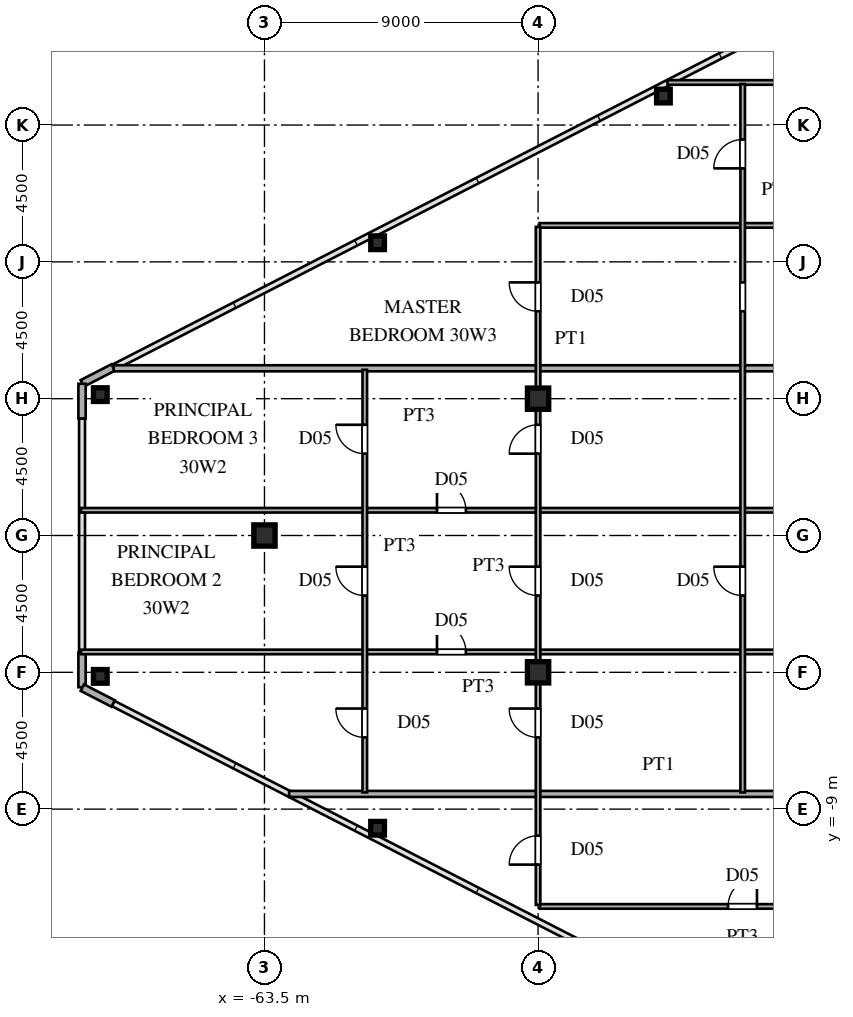
"""IFC4 building model, lengths in metres.
Left out: names, types, materials, properties, quantities, classifications, styles, units other than length and angle.
Written with IfcOpenShell. Run it as: python <this file> out.ifc"""

import sys

from ifc_helpers import new_model, si_unit, direction, frame, frame_2d, origin, origin_2d, place, context, subcontext, project, spatial, rectangle, hollow_rectangle, i_section, extrude, source, transform, mapped, element, fill, save


model = new_model("IFC4")
c1 = context("Model", 3, precision=1e-05, world=origin(), true_north=direction((0.0, 1.0)))
c2 = subcontext(c1, "Body", "Model", "MODEL_VIEW")
j1 = project(units=[si_unit("LENGTHUNIT", "METRE"), si_unit("PLANEANGLEUNIT", "RADIAN")], contexts=[c1])
p1 = place(None, origin())
s1 = spatial("IfcSite", under=j1, at=p1, CompositionType="ELEMENT")
p2 = place(p1, origin())
s2 = spatial("IfcBuilding", under=s1, at=p2, CompositionType="ELEMENT")
p3 = place(p2, frame((0.0, 0.0, 114.0)))
s3 = spatial("IfcBuildingStorey", under=s2, at=p3, CompositionType="ELEMENT", Elevation=114.0)
m1 = source(origin(), c2, "Body", "SweptSolid", [
    extrude(i_section(OverallWidth=0.7, OverallDepth=0.7, WebThickness=0.028, FlangeThickness=0.045, at=origin_2d()), origin(), (0.0, 0.0, 1.0), 3.6),
])
for number, where, z_axis, x_axis in (
    (1, (-54.5, -4.5, 0.0), (0.0, 0.0, 1.0), (1.0, 0.0, 0.0)),
    (2, (-54.5, 4.5, 0.0), (0.0, 0.0, 1.0), (1.0, 0.0, 0.0)),
    (3, (-63.5, 0.0, 0.0), (0.0, 0.0, 1.0), (1.0, 0.0, 0.0)),
):
    element("IfcColumn", number, at=place(p3, frame(where, z_axis=z_axis, x_axis=x_axis)), inside=s3, PredefinedType="COLUMN", context=c2, shape_type="MappedRepresentation", body=[
        mapped(m1, transform((0.0, 0.0, 0.0), scale=1.0)),
    ])
m2 = source(origin(), c2, "Body", "SweptSolid", [
    extrude(hollow_rectangle(XDim=0.45, YDim=0.45, WallThickness=0.018, at=origin_2d()), origin(), (0.0, 0.0, 1.0), 3.6),
])
for number, where, z_axis, x_axis in (
    (4, (-68.9, 4.634, 0.0), (0.0, 0.0, 1.0), (1.0, 0.0, 0.0)),
    (5, (-68.9, -4.634, 0.0), (0.0, 0.0, 1.0), (1.0, 0.0, 0.0)),
    (6, (-59.779, -9.629, 0.0), (0.0, 0.0, 1.0), (1.0, 0.0, 0.0)),
    (7, (-50.377, 14.453, 0.0), (0.0, 0.0, 1.0), (1.0, 0.0, 0.0)),
    (8, (-59.779, 9.629, 0.0), (0.0, 0.0, 1.0), (1.0, 0.0, 0.0)),
):
    element("IfcColumn", number, at=place(p3, frame(where, z_axis=z_axis, x_axis=x_axis)), inside=s3, PredefinedType="COLUMN", context=c2, shape_type="MappedRepresentation", body=[
        mapped(m2, transform((0.0, 0.0, 0.0), scale=1.0)),
    ])
p4 = place(p3, frame((-68.477, 5.525, 0.0), z_axis=(0.0, 0.0, 1.0), x_axis=(-0.889797395748, -0.456355776255, 0.0)))
e9 = element("IfcWall", 9, at=p4, inside=s3, PredefinedType="SOLIDWALL", context=c2, shape_type="SweptSolid", body=[
    extrude(rectangle(XDim=1.14, YDim=0.24, at=frame_2d((0.57, 0.0))), origin(), (0.0, 0.0, 1.0), 3.38),
])
for number, where, z_axis, x_axis in (
    (10, (-69.5, 4.99, 0.0), (0.0, 0.0, 1.0), (0.0, -1.0, 0.0)),
    (11, (-69.5, -3.85, 0.0), (0.0, 0.0, 1.0), (0.0, -1.0, 0.0)),
):
    element("IfcWall", number, at=place(p3, frame(where, z_axis=z_axis, x_axis=x_axis)), inside=s3, PredefinedType="SOLIDWALL", context=c2, shape_type="SweptSolid", body=[
        extrude(rectangle(XDim=1.14, YDim=0.24, at=frame_2d((0.57, 0.0))), origin(), (0.0, 0.0, 1.0), 3.38),
    ])
p5 = place(p3, frame((-69.491, -5.005, 0.0), z_axis=(0.0, 0.0, 1.0), x_axis=(0.889797395748, -0.456355776255, 0.0)))
e12 = element("IfcWall", 12, at=p5, inside=s3, PredefinedType="SOLIDWALL", context=c2, shape_type="SweptSolid", body=[
    extrude(rectangle(XDim=1.14, YDim=0.24, at=frame_2d((0.57, 0.0))), origin(), (0.0, 0.0, 1.0), 3.38),
])
p6 = place(p3, frame((-54.45, -12.2, 0.0), z_axis=(0.0, 0.0, 1.0), x_axis=(1.0, 0.0, 0.0)))
e13 = element("IfcWall", 13, at=p6, inside=s3, PredefinedType="PARTITIONING", context=c2, shape_type="SweptSolid", body=[
    extrude(rectangle(XDim=13.35, YDim=0.15, at=frame_2d((6.675, 0.0))), origin(), (0.0, 0.0, 1.0), 3.38),
])
p7 = place(p6, frame((6.2, 0.0, 0.0)))
e14 = element("IfcOpeningElement", 14, at=p7, cuts=e13, PredefinedType="OPENING", context=c2, shape_type="SweptSolid", body=[
    extrude(rectangle(XDim=0.95, YDim=2.15, at=frame_2d((0.475, 1.075))), frame((0.0, 0.085, 0.0), z_axis=(0.0, -1.0, 0.0), x_axis=(1.0, 0.0, 0.0)), (0.0, 0.0, 1.0), 0.17),
])
p8 = place(p3, frame((-62.69, -8.5, 0.0), z_axis=(0.0, 0.0, 1.0), x_axis=(1.0, 0.0, 0.0)))
e15 = element("IfcWall", 15, at=p8, inside=s3, PredefinedType="PARTITIONING", context=c2, shape_type="SweptSolid", body=[
    extrude(rectangle(XDim=24.31, YDim=0.2, at=frame_2d((12.155, 0.0))), origin(), (0.0, 0.0, 1.0), 3.38),
])
p9 = place(p3, frame((-69.535, -3.83, 0.0), z_axis=(0.0, 0.0, 1.0), x_axis=(1.0, 0.0, 0.0)))
e16 = element("IfcWall", 16, at=p9, inside=s3, PredefinedType="PARTITIONING", context=c2, shape_type="SweptSolid", body=[
    extrude(rectangle(XDim=28.435, YDim=0.15, at=frame_2d((14.217, 0.0))), origin(), (0.0, 0.0, 1.0), 3.38),
])
p10 = place(p9, frame((24.647, 0.0, 0.0)))
e17 = element("IfcOpeningElement", 17, at=p10, cuts=e16, PredefinedType="OPENING", context=c2, shape_type="SweptSolid", body=[
    extrude(rectangle(XDim=0.95, YDim=2.15, at=frame_2d((0.475, 1.075))), frame((0.0, 0.085, 0.0), z_axis=(0.0, -1.0, 0.0), x_axis=(1.0, 0.0, 0.0)), (0.0, 0.0, 1.0), 0.17),
])
p11 = place(p9, frame((11.71, 0.0, 0.0)))
e18 = element("IfcOpeningElement", 18, at=p11, cuts=e16, PredefinedType="OPENING", context=c2, shape_type="SweptSolid", body=[
    extrude(rectangle(XDim=0.95, YDim=2.15, at=frame_2d((0.475, 1.075))), frame((0.0, 0.085, 0.0), z_axis=(0.0, -1.0, 0.0), x_axis=(1.0, 0.0, 0.0)), (0.0, 0.0, 1.0), 0.17),
])
p12 = place(p3, frame((-69.535, 0.83, 0.0), z_axis=(0.0, 0.0, 1.0), x_axis=(1.0, 0.0, 0.0)))
e19 = element("IfcWall", 19, at=p12, inside=s3, PredefinedType="PARTITIONING", context=c2, shape_type="SweptSolid", body=[
    extrude(rectangle(XDim=28.435, YDim=0.15, at=frame_2d((14.217, 0.0))), origin(), (0.0, 0.0, 1.0), 3.38),
])
p13 = place(p12, frame((24.647, 0.0, 0.0)))
e20 = element("IfcOpeningElement", 20, at=p13, cuts=e19, PredefinedType="OPENING", context=c2, shape_type="SweptSolid", body=[
    extrude(rectangle(XDim=0.95, YDim=2.15, at=frame_2d((0.475, 1.075))), frame((0.0, 0.085, 0.0), z_axis=(0.0, -1.0, 0.0), x_axis=(1.0, 0.0, 0.0)), (0.0, 0.0, 1.0), 0.17),
])
p14 = place(p12, frame((11.71, 0.0, 0.0)))
e21 = element("IfcOpeningElement", 21, at=p14, cuts=e19, PredefinedType="OPENING", context=c2, shape_type="SweptSolid", body=[
    extrude(rectangle(XDim=0.95, YDim=2.15, at=frame_2d((0.475, 1.075))), frame((0.0, 0.085, 0.0), z_axis=(0.0, -1.0, 0.0), x_axis=(1.0, 0.0, 0.0)), (0.0, 0.0, 1.0), 0.17),
])
p15 = place(p3, frame((-68.458, 5.5, 0.0), z_axis=(0.0, 0.0, 1.0), x_axis=(1.0, 0.0, 0.0)))
e22 = element("IfcWall", 22, at=p15, inside=s3, PredefinedType="PARTITIONING", context=c2, shape_type="SweptSolid", body=[
    extrude(rectangle(XDim=30.079, YDim=0.2, at=frame_2d((15.039, 0.0))), origin(), (0.0, 0.0, 1.0), 3.38),
])
p16 = place(p3, frame((-54.45, 10.2, 0.0), z_axis=(0.0, 0.0, 1.0), x_axis=(1.0, 0.0, 0.0)))
e23 = element("IfcWall", 23, at=p16, inside=s3, PredefinedType="PARTITIONING", context=c2, shape_type="SweptSolid", body=[
    extrude(rectangle(XDim=13.35, YDim=0.15, at=frame_2d((6.675, 0.0))), origin(), (0.0, 0.0, 1.0), 3.38),
])
p17 = place(p16, frame((9.562, 0.0, 0.0)))
e24 = element("IfcOpeningElement", 24, at=p17, cuts=e23, PredefinedType="OPENING", context=c2, shape_type="SweptSolid", body=[
    extrude(rectangle(XDim=0.95, YDim=2.15, at=frame_2d((0.475, 1.075))), frame((0.0, 0.085, 0.0), z_axis=(0.0, -1.0, 0.0), x_axis=(1.0, 0.0, 0.0)), (0.0, 0.0, 1.0), 0.17),
])
p18 = place(p3, frame((-50.243, 14.9, 0.0), z_axis=(0.0, 0.0, 1.0), x_axis=(1.0, 0.0, 0.0)))
e25 = element("IfcWall", 25, at=p18, inside=s3, PredefinedType="PARTITIONING", context=c2, shape_type="SweptSolid", body=[
    extrude(rectangle(XDim=9.143, YDim=0.15, at=frame_2d((4.571, 0.0))), origin(), (0.0, 0.0, 1.0), 3.38),
])
p19 = place(p18, frame((5.355, 0.0, 0.0)))
e26 = element("IfcOpeningElement", 26, at=p19, cuts=e25, PredefinedType="OPENING", context=c2, shape_type="SweptSolid", body=[
    extrude(rectangle(XDim=0.95, YDim=2.15, at=frame_2d((0.475, 1.075))), frame((0.0, 0.085, 0.0), z_axis=(0.0, -1.0, 0.0), x_axis=(1.0, 0.0, 0.0)), (0.0, 0.0, 1.0), 0.17),
])
p20 = place(p3, frame((-60.2, -8.45, 0.0), z_axis=(0.0, 0.0, 1.0), x_axis=(0.0, 1.0, 0.0)))
e27 = element("IfcWall", 27, at=p20, inside=s3, PredefinedType="PARTITIONING", context=c2, shape_type="SweptSolid", body=[
    extrude(rectangle(XDim=13.9, YDim=0.15, at=frame_2d((6.95, 0.0))), origin(), (0.0, 0.0, 1.0), 3.38),
])
p21 = place(p20, frame((1.808, 0.0, 0.0)))
e28 = element("IfcOpeningElement", 28, at=p21, cuts=e27, PredefinedType="OPENING", context=c2, shape_type="SweptSolid", body=[
    extrude(rectangle(XDim=0.95, YDim=2.15, at=frame_2d((0.475, 1.075))), frame((0.0, 0.085, 0.0), z_axis=(0.0, -1.0, 0.0), x_axis=(1.0, 0.0, 0.0)), (0.0, 0.0, 1.0), 0.17),
])
p22 = place(p20, frame((6.475, 0.0, 0.0)))
e29 = element("IfcOpeningElement", 29, at=p22, cuts=e27, PredefinedType="OPENING", context=c2, shape_type="SweptSolid", body=[
    extrude(rectangle(XDim=0.95, YDim=2.15, at=frame_2d((0.475, 1.075))), frame((0.0, 0.085, 0.0), z_axis=(0.0, -1.0, 0.0), x_axis=(1.0, 0.0, 0.0)), (0.0, 0.0, 1.0), 0.17),
])
p23 = place(p20, frame((11.142, 0.0, 0.0)))
e30 = element("IfcOpeningElement", 30, at=p23, cuts=e27, PredefinedType="OPENING", context=c2, shape_type="SweptSolid", body=[
    extrude(rectangle(XDim=0.95, YDim=2.15, at=frame_2d((0.475, 1.075))), frame((0.0, 0.085, 0.0), z_axis=(0.0, -1.0, 0.0), x_axis=(1.0, 0.0, 0.0)), (0.0, 0.0, 1.0), 0.17),
])
p24 = place(p3, frame((-54.5, -12.15, 0.0), z_axis=(0.0, 0.0, 1.0), x_axis=(0.0, 1.0, 0.0)))
e31 = element("IfcWall", 31, at=p24, inside=s3, PredefinedType="PARTITIONING", context=c2, shape_type="SweptSolid", body=[
    extrude(rectangle(XDim=22.3, YDim=0.15, at=frame_2d((11.15, 0.0))), origin(), (0.0, 0.0, 1.0), 2.78),
])
p25 = place(p24, frame((1.325, 0.0, 0.0)))
e32 = element("IfcOpeningElement", 32, at=p25, cuts=e31, PredefinedType="OPENING", context=c2, shape_type="SweptSolid", body=[
    extrude(rectangle(XDim=0.95, YDim=2.15, at=frame_2d((0.475, 1.075))), frame((0.0, 0.085, 0.0), z_axis=(0.0, -1.0, 0.0), x_axis=(1.0, 0.0, 0.0)), (0.0, 0.0, 1.0), 0.17),
])
p26 = place(p24, frame((10.175, 0.0, 0.0)))
e33 = element("IfcOpeningElement", 33, at=p26, cuts=e31, PredefinedType="OPENING", context=c2, shape_type="SweptSolid", body=[
    extrude(rectangle(XDim=0.95, YDim=2.15, at=frame_2d((0.475, 1.075))), frame((0.0, 0.085, 0.0), z_axis=(0.0, -1.0, 0.0), x_axis=(1.0, 0.0, 0.0)), (0.0, 0.0, 1.0), 0.17),
])
p27 = place(p24, frame((5.508, 0.0, 0.0)))
e34 = element("IfcOpeningElement", 34, at=p27, cuts=e31, PredefinedType="OPENING", context=c2, shape_type="SweptSolid", body=[
    extrude(rectangle(XDim=0.95, YDim=2.15, at=frame_2d((0.475, 1.075))), frame((0.0, 0.085, 0.0), z_axis=(0.0, -1.0, 0.0), x_axis=(1.0, 0.0, 0.0)), (0.0, 0.0, 1.0), 0.17),
])
p28 = place(p24, frame((14.842, 0.0, 0.0)))
e35 = element("IfcOpeningElement", 35, at=p28, cuts=e31, PredefinedType="OPENING", context=c2, shape_type="SweptSolid", body=[
    extrude(rectangle(XDim=0.95, YDim=2.15, at=frame_2d((0.475, 1.075))), frame((0.0, 0.085, 0.0), z_axis=(0.0, -1.0, 0.0), x_axis=(1.0, 0.0, 0.0)), (0.0, 0.0, 1.0), 0.17),
])
p29 = place(p24, frame((19.525, 0.0, 0.0)))
e36 = element("IfcOpeningElement", 36, at=p29, cuts=e31, PredefinedType="OPENING", context=c2, shape_type="SweptSolid", body=[
    extrude(rectangle(XDim=0.95, YDim=2.15, at=frame_2d((0.475, 1.075))), frame((0.0, 0.085, 0.0), z_axis=(0.0, -1.0, 0.0), x_axis=(1.0, 0.0, 0.0)), (0.0, 0.0, 1.0), 0.17),
])
p30 = place(p3, frame((-47.77, -8.45, 0.0), z_axis=(0.0, 0.0, 1.0), x_axis=(0.0, 1.0, 0.0)))
e37 = element("IfcWall", 37, at=p30, inside=s3, PredefinedType="PARTITIONING", context=c2, shape_type="SweptSolid", body=[
    extrude(rectangle(XDim=23.3, YDim=0.15, at=frame_2d((11.65, 0.0))), origin(), (0.0, 0.0, 1.0), 3.38),
])
p31 = place(p30, frame((6.475, 0.0, 0.0)))
e38 = element("IfcOpeningElement", 38, at=p31, cuts=e37, PredefinedType="OPENING", context=c2, shape_type="SweptSolid", body=[
    extrude(rectangle(XDim=0.95, YDim=2.15, at=frame_2d((0.475, 1.075))), frame((0.0, 0.085, 0.0), z_axis=(0.0, -1.0, 0.0), x_axis=(1.0, 0.0, 0.0)), (0.0, 0.0, 1.0), 0.17),
])
p32 = place(p30, frame((20.525, 0.0, 0.0)))
e39 = element("IfcOpeningElement", 39, at=p32, cuts=e37, PredefinedType="OPENING", context=c2, shape_type="SweptSolid", body=[
    extrude(rectangle(XDim=0.95, YDim=2.15, at=frame_2d((0.475, 1.075))), frame((0.0, 0.085, 0.0), z_axis=(0.0, -1.0, 0.0), x_axis=(1.0, 0.0, 0.0)), (0.0, 0.0, 1.0), 0.17),
])
p33 = place(p30, frame((15.825, 0.0, 0.0)))
e40 = element("IfcOpeningElement", 40, at=p33, cuts=e37, PredefinedType="OPENING", context=c2, shape_type="SweptSolid", body=[
    extrude(rectangle(XDim=0.95, YDim=2.15, at=frame_2d((0.475, 1.075))), frame((0.0, 0.085, 0.0), z_axis=(0.0, -1.0, 0.0), x_axis=(1.0, 0.0, 0.0)), (0.0, 0.0, 1.0), 0.17),
])
m3 = source(origin(), c2, "Body", "SweptSolid", [
    extrude(rectangle(XDim=0.95, YDim=2.15, at=frame_2d((0.475, 1.075))), frame((0.0, 0.025, 0.0), z_axis=(0.0, -1.0, 0.0), x_axis=(1.0, 0.0, 0.0)), (0.0, 0.0, 1.0), 0.05),
])
p34 = place(p7, origin())
e41 = element("IfcDoor", 41, at=p34, inside=s3, OperationType="SINGLE_SWING_RIGHT", PredefinedType="DOOR", context=c2, shape_type="MappedRepresentation", body=[
    mapped(m3, transform((0.0, 0.0, 0.0), scale=1.0)),
])
fill(e14, e41)
p35 = place(p11, origin())
e42 = element("IfcDoor", 42, at=p35, inside=s3, OperationType="SINGLE_SWING_LEFT", PredefinedType="DOOR", context=c2, shape_type="MappedRepresentation", body=[
    mapped(m3, transform((0.0, 0.0, 0.0), scale=1.0)),
])
fill(e18, e42)
p36 = place(p14, origin())
e43 = element("IfcDoor", 43, at=p36, inside=s3, OperationType="SINGLE_SWING_LEFT", PredefinedType="DOOR", context=c2, shape_type="MappedRepresentation", body=[
    mapped(m3, transform((0.0, 0.0, 0.0), scale=1.0)),
])
fill(e21, e43)
p37 = place(p21, origin())
e44 = element("IfcDoor", 44, at=p37, inside=s3, OperationType="SINGLE_SWING_RIGHT", PredefinedType="DOOR", context=c2, shape_type="MappedRepresentation", body=[
    mapped(m3, transform((0.0, 0.0, 0.0), scale=1.0)),
])
fill(e28, e44)
p38 = place(p22, origin())
e45 = element("IfcDoor", 45, at=p38, inside=s3, OperationType="SINGLE_SWING_RIGHT", PredefinedType="DOOR", context=c2, shape_type="MappedRepresentation", body=[
    mapped(m3, transform((0.0, 0.0, 0.0), scale=1.0)),
])
fill(e29, e45)
p39 = place(p23, origin())
e46 = element("IfcDoor", 46, at=p39, inside=s3, OperationType="SINGLE_SWING_RIGHT", PredefinedType="DOOR", context=c2, shape_type="MappedRepresentation", body=[
    mapped(m3, transform((0.0, 0.0, 0.0), scale=1.0)),
])
fill(e30, e46)
p40 = place(p25, origin())
e47 = element("IfcDoor", 47, at=p40, inside=s3, OperationType="SINGLE_SWING_LEFT", PredefinedType="DOOR", context=c2, shape_type="MappedRepresentation", body=[
    mapped(m3, transform((0.0, 0.0, 0.0), scale=1.0)),
])
fill(e32, e47)
p41 = place(p26, origin())
e48 = element("IfcDoor", 48, at=p41, inside=s3, OperationType="SINGLE_SWING_RIGHT", PredefinedType="DOOR", context=c2, shape_type="MappedRepresentation", body=[
    mapped(m3, transform((0.0, 0.0, 0.0), scale=1.0)),
])
fill(e33, e48)
p42 = place(p27, origin())
e49 = element("IfcDoor", 49, at=p42, inside=s3, OperationType="SINGLE_SWING_RIGHT", PredefinedType="DOOR", context=c2, shape_type="MappedRepresentation", body=[
    mapped(m3, transform((0.0, 0.0, 0.0), scale=1.0)),
])
fill(e34, e49)
p43 = place(p28, origin())
e50 = element("IfcDoor", 50, at=p43, inside=s3, OperationType="SINGLE_SWING_LEFT", PredefinedType="DOOR", context=c2, shape_type="MappedRepresentation", body=[
    mapped(m3, transform((0.0, 0.0, 0.0), scale=1.0)),
])
fill(e35, e50)
p44 = place(p29, origin())
e51 = element("IfcDoor", 51, at=p44, inside=s3, OperationType="SINGLE_SWING_RIGHT", PredefinedType="DOOR", context=c2, shape_type="MappedRepresentation", body=[
    mapped(m3, transform((0.0, 0.0, 0.0), scale=1.0)),
])
fill(e36, e51)
p45 = place(p31, origin())
e52 = element("IfcDoor", 52, at=p45, inside=s3, OperationType="SINGLE_SWING_RIGHT", PredefinedType="DOOR", context=c2, shape_type="MappedRepresentation", body=[
    mapped(m3, transform((0.0, 0.0, 0.0), scale=1.0)),
])
fill(e38, e52)
p46 = place(p32, origin())
e53 = element("IfcDoor", 53, at=p46, inside=s3, OperationType="SINGLE_SWING_LEFT", PredefinedType="DOOR", context=c2, shape_type="MappedRepresentation", body=[
    mapped(m3, transform((0.0, 0.0, 0.0), scale=1.0)),
])
fill(e39, e53)
save(model, sys.argv[1])
